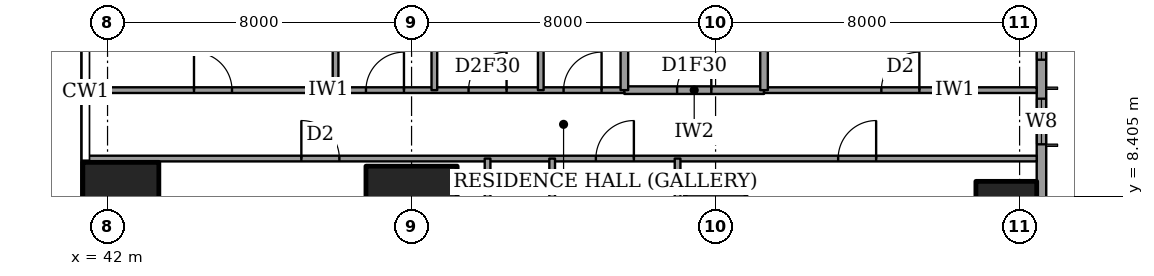
"""IFC4 building model, lengths in metres.
Left out: names, types, materials, properties, quantities, classifications, styles, units other than length and angle.
Written with IfcOpenShell. Run it as: python <this file> out.ifc"""

import sys

from ifc_helpers import new_model, si_unit, direction, frame, frame_2d, origin, origin_2d, place, context, subcontext, project, spatial, rectangle, extrude, element, fill, save


model = new_model("IFC4")
c1 = context("Model", 3, precision=1e-05, world=origin(), true_north=direction((0.0, 1.0)))
c2 = subcontext(c1, "Body", "Model", "MODEL_VIEW")
j1 = project(units=[si_unit("LENGTHUNIT", "METRE"), si_unit("PLANEANGLEUNIT", "RADIAN")], contexts=[c1])
p1 = place(None, origin())
s1 = spatial("IfcSite", under=j1, at=p1, CompositionType="ELEMENT")
p2 = place(p1, origin())
s2 = spatial("IfcBuilding", under=s1, at=p2, CompositionType="ELEMENT")
p3 = place(p2, frame((0.0, 0.0, 252.0)))
s3 = spatial("IfcBuildingStorey", under=s2, at=p3, CompositionType="ELEMENT", Elevation=252.0)
p4 = place(p3, frame((42.35, 8.0, 0.0), z_axis=(0.0, 0.0, 1.0), x_axis=(1.0, 0.0, 0.0)))
e1 = element("IfcColumn", 1, at=p4, inside=s3, PredefinedType="COLUMN", context=c2, shape_type="SweptSolid", body=[
    extrude(rectangle(XDim=2.0, YDim=2.6, at=origin_2d()), origin(), (0.0, 0.0, 1.0), 3.6),
])
p5 = place(p3, frame((50.0, 8.0, 0.0), z_axis=(0.0, 0.0, 1.0), x_axis=(1.0, 0.0, 0.0)))
e2 = element("IfcColumn", 2, at=p5, inside=s3, PredefinedType="COLUMN", context=c2, shape_type="SweptSolid", body=[
    extrude(rectangle(XDim=2.4, YDim=2.4, at=origin_2d()), origin(), (0.0, 0.0, 1.0), 3.6),
])
for number, where, z_axis, x_axis in (
    (3, (58.0, 8.0, 0.0), (0.0, 0.0, 1.0), (1.0, 0.0, 0.0)),
    (4, (65.65, 8.0, 0.0), (0.0, 0.0, 1.0), (1.0, 0.0, 0.0)),
):
    element("IfcColumn", number, at=place(p3, frame(where, z_axis=z_axis, x_axis=x_axis)), inside=s3, PredefinedType="COLUMN", context=c2, shape_type="SweptSolid", body=[
        extrude(rectangle(XDim=1.6, YDim=1.6, at=origin_2d()), origin(), (0.0, 0.0, 1.0), 3.6),
    ])
p6 = place(p3, frame((66.575, 3.175, 0.0), z_axis=(0.0, 0.0, 1.0), x_axis=(0.0, 1.0, 0.0)))
e5 = element("IfcWall", 5, at=p6, inside=s3, PredefinedType="SOLIDWALL", context=c2, shape_type="SweptSolid", body=[
    extrude(rectangle(XDim=41.65, YDim=0.25, at=frame_2d((20.825, 0.0))), origin(), (0.0, 0.0, 1.0), 3.6),
])
p7 = place(p6, frame((0.875, 0.0, 0.6)))
e6 = element("IfcOpeningElement", 6, at=p7, cuts=e5, PredefinedType="OPENING", context=c2, shape_type="SweptSolid", body=[
    extrude(rectangle(XDim=2.4, YDim=2.0, at=frame_2d((1.2, 1.0))), frame((0.0, 0.135, 0.0), z_axis=(0.0, -1.0, 0.0), x_axis=(1.0, 0.0, 0.0)), (0.0, 0.0, 1.0), 0.27),
])
p8 = place(p6, frame((6.6, 0.0, 0.6)))
e7 = element("IfcOpeningElement", 7, at=p8, cuts=e5, PredefinedType="OPENING", context=c2, shape_type="SweptSolid", body=[
    extrude(rectangle(XDim=1.2, YDim=2.0, at=frame_2d((0.6, 1.0))), frame((0.0, 0.135, 0.0), z_axis=(0.0, -1.0, 0.0), x_axis=(1.0, 0.0, 0.0)), (0.0, 0.0, 1.0), 0.27),
])
p9 = place(p6, frame((8.825, 0.0, 0.6)))
e8 = element("IfcOpeningElement", 8, at=p9, cuts=e5, PredefinedType="OPENING", context=c2, shape_type="SweptSolid", body=[
    extrude(rectangle(XDim=2.4, YDim=2.0, at=frame_2d((1.2, 1.0))), frame((0.0, 0.135, 0.0), z_axis=(0.0, -1.0, 0.0), x_axis=(1.0, 0.0, 0.0)), (0.0, 0.0, 1.0), 0.27),
])
p10 = place(p6, frame((15.725, 0.0, 0.6)))
e9 = element("IfcOpeningElement", 9, at=p10, cuts=e5, PredefinedType="OPENING", context=c2, shape_type="SweptSolid", body=[
    extrude(rectangle(XDim=2.4, YDim=2.0, at=frame_2d((1.2, 1.0))), frame((0.0, 0.135, 0.0), z_axis=(0.0, -1.0, 0.0), x_axis=(1.0, 0.0, 0.0)), (0.0, 0.0, 1.0), 0.27),
])
p11 = place(p6, frame((23.625, 0.0, 0.6)))
e10 = element("IfcOpeningElement", 10, at=p11, cuts=e5, PredefinedType="OPENING", context=c2, shape_type="SweptSolid", body=[
    extrude(rectangle(XDim=2.4, YDim=2.0, at=frame_2d((1.2, 1.0))), frame((0.0, 0.135, 0.0), z_axis=(0.0, -1.0, 0.0), x_axis=(1.0, 0.0, 0.0)), (0.0, 0.0, 1.0), 0.27),
])
p12 = place(p6, frame((30.725, 0.0, 0.6)))
e11 = element("IfcOpeningElement", 11, at=p12, cuts=e5, PredefinedType="OPENING", context=c2, shape_type="SweptSolid", body=[
    extrude(rectangle(XDim=2.4, YDim=2.0, at=frame_2d((1.2, 1.0))), frame((0.0, 0.135, 0.0), z_axis=(0.0, -1.0, 0.0), x_axis=(1.0, 0.0, 0.0)), (0.0, 0.0, 1.0), 0.27),
])
p13 = place(p6, frame((34.525, 0.0, 0.6)))
e12 = element("IfcOpeningElement", 12, at=p13, cuts=e5, PredefinedType="OPENING", context=c2, shape_type="SweptSolid", body=[
    extrude(rectangle(XDim=1.2, YDim=2.0, at=frame_2d((0.6, 1.0))), frame((0.0, 0.135, 0.0), z_axis=(0.0, -1.0, 0.0), x_axis=(1.0, 0.0, 0.0)), (0.0, 0.0, 1.0), 0.27),
])
p14 = place(p6, frame((38.375, 0.0, 0.6)))
e13 = element("IfcOpeningElement", 13, at=p14, cuts=e5, PredefinedType="OPENING", context=c2, shape_type="SweptSolid", body=[
    extrude(rectangle(XDim=2.4, YDim=2.0, at=frame_2d((1.2, 1.0))), frame((0.0, 0.135, 0.0), z_axis=(0.0, -1.0, 0.0), x_axis=(1.0, 0.0, 0.0)), (0.0, 0.0, 1.0), 0.27),
])
p15 = place(p3, frame((41.439, 9.4, 0.0), z_axis=(0.0, 0.0, 1.0), x_axis=(1.0, 0.0, 0.0)))
e14 = element("IfcWall", 14, at=p15, inside=s3, PredefinedType="PARTITIONING", context=c2, shape_type="SweptSolid", body=[
    extrude(rectangle(XDim=25.011, YDim=0.15, at=frame_2d((12.505, 0.0))), origin(), (0.0, 0.0, 1.0), 3.35),
])
p16 = place(p15, frame((19.786, 0.0, 0.0)))
e15 = element("IfcOpeningElement", 15, at=p16, cuts=e14, PredefinedType="OPENING", context=c2, shape_type="SweptSolid", body=[
    extrude(rectangle(XDim=1.0, YDim=2.1, at=frame_2d((0.5, 1.05))), frame((0.0, 0.085, 0.0), z_axis=(0.0, -1.0, 0.0), x_axis=(1.0, 0.0, 0.0)), (0.0, 0.0, 1.0), 0.17),
])
p17 = place(p15, frame((13.411, 0.0, 0.0)))
e16 = element("IfcOpeningElement", 16, at=p17, cuts=e14, PredefinedType="OPENING", context=c2, shape_type="SweptSolid", body=[
    extrude(rectangle(XDim=1.0, YDim=2.1, at=frame_2d((0.5, 1.05))), frame((0.0, 0.085, 0.0), z_axis=(0.0, -1.0, 0.0), x_axis=(1.0, 0.0, 0.0)), (0.0, 0.0, 1.0), 0.17),
])
p18 = place(p15, frame((5.661, 0.0, 0.0)))
e17 = element("IfcOpeningElement", 17, at=p18, cuts=e14, PredefinedType="OPENING", context=c2, shape_type="SweptSolid", body=[
    extrude(rectangle(XDim=1.0, YDim=2.1, at=frame_2d((0.5, 1.05))), frame((0.0, 0.085, 0.0), z_axis=(0.0, -1.0, 0.0), x_axis=(1.0, 0.0, 0.0)), (0.0, 0.0, 1.0), 0.17),
])
p19 = place(p3, frame((55.6, 11.2, 0.0), z_axis=(0.0, 0.0, 1.0), x_axis=(1.0, 0.0, 0.0)))
e18 = element("IfcWall", 18, at=p19, inside=s3, PredefinedType="PARTITIONING", context=c2, shape_type="SweptSolid", body=[
    extrude(rectangle(XDim=3.675, YDim=0.2, at=frame_2d((1.837, 0.0))), origin(), (0.0, 0.0, 1.0), 3.35),
])
p20 = place(p19, frame((1.387, 0.0, 0.0)))
e19 = element("IfcOpeningElement", 19, at=p20, cuts=e18, PredefinedType="OPENING", context=c2, shape_type="SweptSolid", body=[
    extrude(rectangle(XDim=0.9, YDim=2.1, at=frame_2d((0.45, 1.05))), frame((0.0, 0.11, 0.0), z_axis=(0.0, -1.0, 0.0), x_axis=(1.0, 0.0, 0.0)), (0.0, 0.0, 1.0), 0.22),
])
p21 = place(p3, frame((41.439, 11.2, 0.0), z_axis=(0.0, 0.0, 1.0), x_axis=(1.0, 0.0, 0.0)))
e20 = element("IfcWall", 20, at=p21, inside=s3, PredefinedType="PARTITIONING", context=c2, shape_type="SweptSolid", body=[
    extrude(rectangle(XDim=14.161, YDim=0.15, at=frame_2d((7.081, 0.0))), origin(), (0.0, 0.0, 1.0), 3.35),
])
p22 = place(p21, frame((12.561, 0.0, 0.0)))
e21 = element("IfcOpeningElement", 21, at=p22, cuts=e20, PredefinedType="OPENING", context=c2, shape_type="SweptSolid", body=[
    extrude(rectangle(XDim=1.0, YDim=2.1, at=frame_2d((0.5, 1.05))), frame((0.0, 0.085, 0.0), z_axis=(0.0, -1.0, 0.0), x_axis=(1.0, 0.0, 0.0)), (0.0, 0.0, 1.0), 0.17),
])
p23 = place(p21, frame((10.061, 0.0, 0.0)))
e22 = element("IfcOpeningElement", 22, at=p23, cuts=e20, PredefinedType="OPENING", context=c2, shape_type="SweptSolid", body=[
    extrude(rectangle(XDim=1.0, YDim=2.1, at=frame_2d((0.5, 1.05))), frame((0.0, 0.085, 0.0), z_axis=(0.0, -1.0, 0.0), x_axis=(1.0, 0.0, 0.0)), (0.0, 0.0, 1.0), 0.17),
])
p24 = place(p21, frame((7.361, 0.0, 0.0)))
e23 = element("IfcOpeningElement", 23, at=p24, cuts=e20, PredefinedType="OPENING", context=c2, shape_type="SweptSolid", body=[
    extrude(rectangle(XDim=1.0, YDim=2.1, at=frame_2d((0.5, 1.05))), frame((0.0, 0.085, 0.0), z_axis=(0.0, -1.0, 0.0), x_axis=(1.0, 0.0, 0.0)), (0.0, 0.0, 1.0), 0.17),
])
p25 = place(p21, frame((2.836, 0.0, 0.0)))
e24 = element("IfcOpeningElement", 24, at=p25, cuts=e20, PredefinedType="OPENING", context=c2, shape_type="SweptSolid", body=[
    extrude(rectangle(XDim=1.0, YDim=2.1, at=frame_2d((0.5, 1.05))), frame((0.0, 0.085, 0.0), z_axis=(0.0, -1.0, 0.0), x_axis=(1.0, 0.0, 0.0)), (0.0, 0.0, 1.0), 0.17),
])
p26 = place(p3, frame((59.275, 11.2, 0.0), z_axis=(0.0, 0.0, 1.0), x_axis=(1.0, 0.0, 0.0)))
e25 = element("IfcWall", 25, at=p26, inside=s3, PredefinedType="PARTITIONING", context=c2, shape_type="SweptSolid", body=[
    extrude(rectangle(XDim=7.175, YDim=0.15, at=frame_2d((3.587, 0.0))), origin(), (0.0, 0.0, 1.0), 3.35),
])
p27 = place(p26, frame((3.087, 0.0, 0.0)))
e26 = element("IfcOpeningElement", 26, at=p27, cuts=e25, PredefinedType="OPENING", context=c2, shape_type="SweptSolid", body=[
    extrude(rectangle(XDim=1.0, YDim=2.1, at=frame_2d((0.5, 1.05))), frame((0.0, 0.085, 0.0), z_axis=(0.0, -1.0, 0.0), x_axis=(1.0, 0.0, 0.0)), (0.0, 0.0, 1.0), 0.17),
])
p28 = place(p3, frame((48.0, 11.2, 0.0), z_axis=(0.0, 0.0, 1.0), x_axis=(0.0, 1.0, 0.0)))
e27 = element("IfcWall", 27, at=p28, inside=s3, PredefinedType="PARTITIONING", context=c2, shape_type="SweptSolid", body=[
    extrude(rectangle(XDim=6.8, YDim=0.15, at=frame_2d((3.4, 0.0))), origin(), (0.0, 0.0, 1.0), 3.35),
])
p29 = place(p3, frame((50.6, 11.2, 0.0), z_axis=(0.0, 0.0, 1.0), x_axis=(0.0, 1.0, 0.0)))
e28 = element("IfcWall", 28, at=p29, inside=s3, PredefinedType="PARTITIONING", context=c2, shape_type="SweptSolid", body=[
    extrude(rectangle(XDim=3.6, YDim=0.15, at=frame_2d((1.8, 0.0))), origin(), (0.0, 0.0, 1.0), 3.35),
])
p30 = place(p3, frame((52.0, -0.45, 0.0), z_axis=(0.0, 0.0, 1.0), x_axis=(0.0, 1.0, 0.0)))
e29 = element("IfcWall", 29, at=p30, inside=s3, PredefinedType="PARTITIONING", context=c2, shape_type="SweptSolid", body=[
    extrude(rectangle(XDim=9.85, YDim=0.15, at=frame_2d((4.925, 0.0))), origin(), (0.0, 0.0, 1.0), 3.35),
])
p31 = place(p3, frame((53.4, 11.2, 0.0), z_axis=(0.0, 0.0, 1.0), x_axis=(0.0, 1.0, 0.0)))
e30 = element("IfcWall", 30, at=p31, inside=s3, PredefinedType="PARTITIONING", context=c2, shape_type="SweptSolid", body=[
    extrude(rectangle(XDim=6.8, YDim=0.15, at=frame_2d((3.4, 0.0))), origin(), (0.0, 0.0, 1.0), 3.35),
])
p32 = place(p3, frame((53.7, -0.45, 0.0), z_axis=(0.0, 0.0, 1.0), x_axis=(0.0, 1.0, 0.0)))
e31 = element("IfcWall", 31, at=p32, inside=s3, PredefinedType="PARTITIONING", context=c2, shape_type="SweptSolid", body=[
    extrude(rectangle(XDim=9.85, YDim=0.15, at=frame_2d((4.925, 0.0))), origin(), (0.0, 0.0, 1.0), 3.35),
])
p33 = place(p32, frame((4.475, 0.0, 0.0)))
e32 = element("IfcOpeningElement", 32, at=p33, cuts=e31, PredefinedType="OPENING", context=c2, shape_type="SweptSolid", body=[
    extrude(rectangle(XDim=0.9, YDim=2.1, at=frame_2d((0.45, 1.05))), frame((0.0, 0.085, 0.0), z_axis=(0.0, -1.0, 0.0), x_axis=(1.0, 0.0, 0.0)), (0.0, 0.0, 1.0), 0.17),
])
p34 = place(p3, frame((55.6, 11.2, 0.0), z_axis=(0.0, 0.0, 1.0), x_axis=(0.0, 1.0, 0.0)))
e33 = element("IfcWall", 33, at=p34, inside=s3, PredefinedType="PARTITIONING", context=c2, shape_type="SweptSolid", body=[
    extrude(rectangle(XDim=3.4, YDim=0.2, at=frame_2d((1.7, 0.0))), origin(), (0.0, 0.0, 1.0), 3.35),
])
p35 = place(p3, frame((57.0, -0.45, 0.0), z_axis=(0.0, 0.0, 1.0), x_axis=(0.0, 1.0, 0.0)))
e34 = element("IfcWall", 34, at=p35, inside=s3, PredefinedType="PARTITIONING", context=c2, shape_type="SweptSolid", body=[
    extrude(rectangle(XDim=9.85, YDim=0.15, at=frame_2d((4.925, 0.0))), origin(), (0.0, 0.0, 1.0), 3.35),
])
p36 = place(p3, frame((59.275, 11.2, 0.0), z_axis=(0.0, 0.0, 1.0), x_axis=(0.0, 1.0, 0.0)))
e35 = element("IfcWall", 35, at=p36, inside=s3, PredefinedType="PARTITIONING", context=c2, shape_type="SweptSolid", body=[
    extrude(rectangle(XDim=3.4, YDim=0.2, at=frame_2d((1.7, 0.0))), origin(), (0.0, 0.0, 1.0), 3.35),
])
p37 = place(p8, origin())
e36 = element("IfcWindow", 36, at=p37, inside=s3, PartitioningType="SINGLE_PANEL", PredefinedType="WINDOW", context=c2, shape_type="SweptSolid", body=[
    extrude(rectangle(XDim=1.2, YDim=2.0, at=frame_2d((0.6, 1.0))), frame((0.0, 0.03, 0.0), z_axis=(0.0, -1.0, 0.0), x_axis=(1.0, 0.0, 0.0)), (0.0, 0.0, 1.0), 0.06),
])
fill(e7, e36)
p38 = place(p9, origin())
e37 = element("IfcWindow", 37, at=p38, inside=s3, PartitioningType="SINGLE_PANEL", PredefinedType="WINDOW", context=c2, shape_type="SweptSolid", body=[
    extrude(rectangle(XDim=2.4, YDim=2.0, at=frame_2d((1.2, 1.0))), frame((0.0, 0.03, 0.0), z_axis=(0.0, -1.0, 0.0), x_axis=(1.0, 0.0, 0.0)), (0.0, 0.0, 1.0), 0.06),
])
fill(e8, e37)
p39 = place(p16, origin())
e38 = element("IfcDoor", 38, at=p39, inside=s3, OperationType="SINGLE_SWING_LEFT", PredefinedType="DOOR", context=c2, shape_type="SweptSolid", body=[
    extrude(rectangle(XDim=1.0, YDim=2.1, at=frame_2d((0.5, 1.05))), frame((0.0, 0.025, 0.0), z_axis=(0.0, -1.0, 0.0), x_axis=(1.0, 0.0, 0.0)), (0.0, 0.0, 1.0), 0.05),
])
fill(e15, e38)
p40 = place(p17, origin())
e39 = element("IfcDoor", 39, at=p40, inside=s3, OperationType="SINGLE_SWING_LEFT", PredefinedType="DOOR", context=c2, shape_type="SweptSolid", body=[
    extrude(rectangle(XDim=1.0, YDim=2.1, at=frame_2d((0.5, 1.05))), frame((0.0, 0.025, 0.0), z_axis=(0.0, -1.0, 0.0), x_axis=(1.0, 0.0, 0.0)), (0.0, 0.0, 1.0), 0.05),
])
fill(e16, e39)
p41 = place(p18, origin())
e40 = element("IfcDoor", 40, at=p41, inside=s3, OperationType="SINGLE_SWING_RIGHT", PredefinedType="DOOR", context=c2, shape_type="SweptSolid", body=[
    extrude(rectangle(XDim=1.0, YDim=2.1, at=frame_2d((0.5, 1.05))), frame((0.0, 0.025, 0.0), z_axis=(0.0, -1.0, 0.0), x_axis=(1.0, 0.0, 0.0)), (0.0, 0.0, 1.0), 0.05),
])
fill(e17, e40)
p42 = place(p22, origin())
e41 = element("IfcDoor", 41, at=p42, inside=s3, OperationType="SINGLE_SWING_LEFT", PredefinedType="DOOR", context=c2, shape_type="SweptSolid", body=[
    extrude(rectangle(XDim=1.0, YDim=2.1, at=frame_2d((0.5, 1.05))), frame((0.0, 0.025, 0.0), z_axis=(0.0, -1.0, 0.0), x_axis=(1.0, 0.0, 0.0)), (0.0, 0.0, 1.0), 0.05),
])
fill(e21, e41)
p43 = place(p27, origin())
e42 = element("IfcDoor", 42, at=p43, inside=s3, OperationType="SINGLE_SWING_LEFT", PredefinedType="DOOR", context=c2, shape_type="SweptSolid", body=[
    extrude(rectangle(XDim=1.0, YDim=2.1, at=frame_2d((0.5, 1.05))), frame((0.0, 0.025, 0.0), z_axis=(0.0, -1.0, 0.0), x_axis=(1.0, 0.0, 0.0)), (0.0, 0.0, 1.0), 0.05),
])
fill(e26, e42)
p44 = place(p20, origin())
e43 = element("IfcDoor", 43, at=p44, inside=s3, OperationType="SINGLE_SWING_LEFT", PredefinedType="DOOR", context=c2, shape_type="SweptSolid", body=[
    extrude(rectangle(XDim=0.9, YDim=2.1, at=frame_2d((0.45, 1.05))), frame((0.0, 0.025, 0.0), z_axis=(0.0, -1.0, 0.0), x_axis=(1.0, 0.0, 0.0)), (0.0, 0.0, 1.0), 0.05),
])
fill(e19, e43)
p45 = place(p23, origin())
e44 = element("IfcDoor", 44, at=p45, inside=s3, OperationType="SINGLE_SWING_LEFT", PredefinedType="DOOR", context=c2, shape_type="SweptSolid", body=[
    extrude(rectangle(XDim=1.0, YDim=2.1, at=frame_2d((0.5, 1.05))), frame((0.0, 0.025, 0.0), z_axis=(0.0, -1.0, 0.0), x_axis=(1.0, 0.0, 0.0)), (0.0, 0.0, 1.0), 0.05),
])
fill(e22, e44)
p46 = place(p24, origin())
e45 = element("IfcDoor", 45, at=p46, inside=s3, OperationType="SINGLE_SWING_LEFT", PredefinedType="DOOR", context=c2, shape_type="SweptSolid", body=[
    extrude(rectangle(XDim=1.0, YDim=2.1, at=frame_2d((0.5, 1.05))), frame((0.0, 0.025, 0.0), z_axis=(0.0, -1.0, 0.0), x_axis=(1.0, 0.0, 0.0)), (0.0, 0.0, 1.0), 0.05),
])
fill(e23, e45)
p47 = place(p25, origin())
e46 = element("IfcDoor", 46, at=p47, inside=s3, OperationType="SINGLE_SWING_RIGHT", PredefinedType="DOOR", context=c2, shape_type="SweptSolid", body=[
    extrude(rectangle(XDim=1.0, YDim=2.1, at=frame_2d((0.5, 1.05))), frame((0.0, 0.025, 0.0), z_axis=(0.0, -1.0, 0.0), x_axis=(1.0, 0.0, 0.0)), (0.0, 0.0, 1.0), 0.05),
])
fill(e24, e46)
save(model, sys.argv[1])
